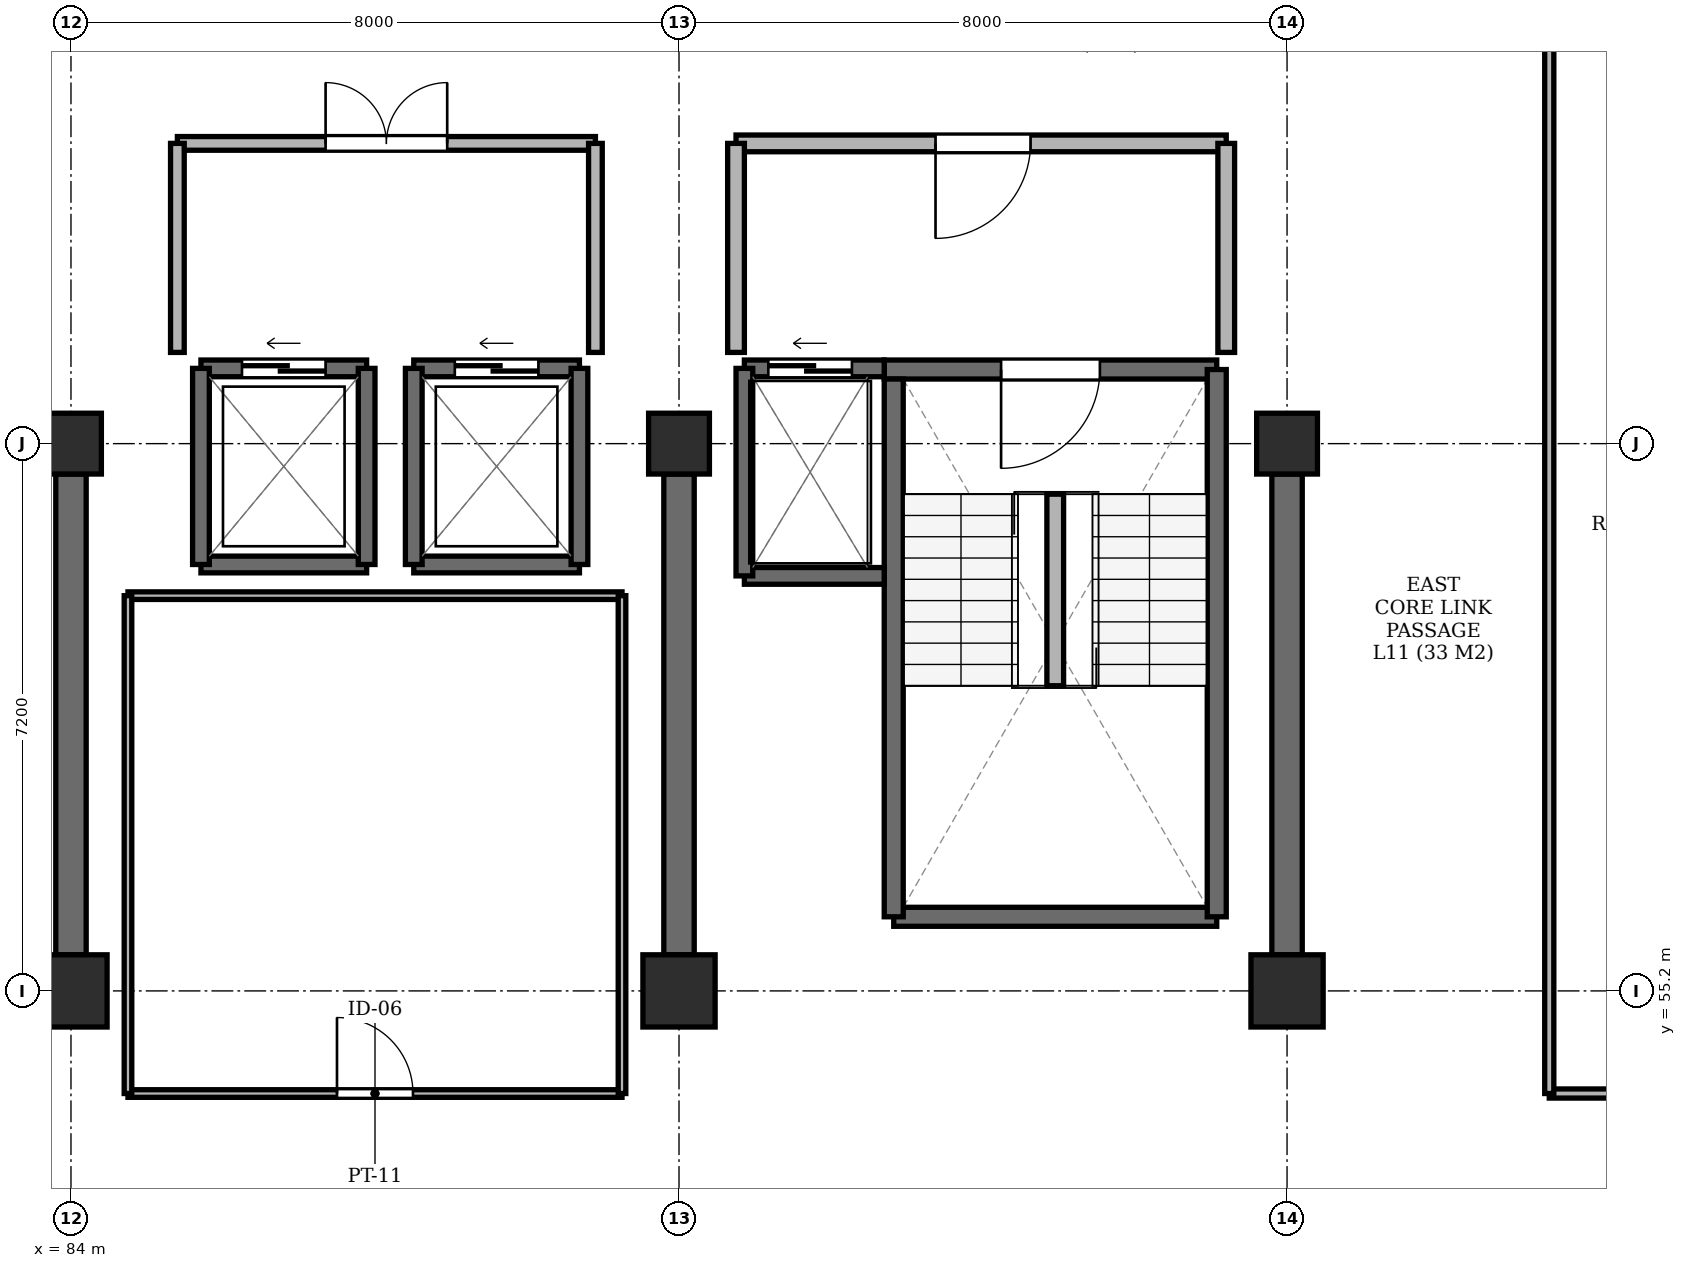
"""IFC4 building model, lengths in metres.
Left out: names, types, materials, properties, quantities, classifications, styles, units other than length and angle.
Written with IfcOpenShell. Run it as: python <this file> out.ifc"""

import sys

from ifc_helpers import new_model, si_unit, direction, frame, frame_2d, origin, origin_2d, place, context, subcontext, project, spatial, rectangle, extrude, element, fill, save


model = new_model("IFC4")
c1 = context("Model", 3, precision=1e-05, world=origin(), true_north=direction((0.0, 1.0)))
c2 = subcontext(c1, "Body", "Model", "MODEL_VIEW")
j1 = project(units=[si_unit("LENGTHUNIT", "METRE"), si_unit("PLANEANGLEUNIT", "RADIAN")], contexts=[c1])
p1 = place(None, origin())
s1 = spatial("IfcSite", under=j1, at=p1, CompositionType="ELEMENT")
p2 = place(p1, origin())
s2 = spatial("IfcBuilding", under=s1, at=p2, CompositionType="ELEMENT")
p3 = place(p2, frame((0.0, 0.0, 47.05)))
s3 = spatial("IfcBuildingStorey", under=s2, at=p3, CompositionType="ELEMENT", Elevation=47.05)
p4 = place(p3, frame((84.0, 55.2, -0.23), z_axis=(0.0, 0.0, 1.0), x_axis=(1.0, 0.0, 0.0)))
e1 = element("IfcColumn", 1, at=p4, inside=s3, PredefinedType="COLUMN", context=c2, shape_type="SweptSolid", body=[
    extrude(rectangle(XDim=0.95, YDim=0.95, at=origin_2d()), origin(), (0.0, 0.0, 1.0), 3.25),
])
p5 = place(p3, frame((84.0, 62.4, -0.23), z_axis=(0.0, 0.0, 1.0), x_axis=(1.0, 0.0, 0.0)))
e2 = element("IfcColumn", 2, at=p5, inside=s3, PredefinedType="COLUMN", context=c2, shape_type="SweptSolid", body=[
    extrude(rectangle(XDim=0.8, YDim=0.8, at=origin_2d()), origin(), (0.0, 0.0, 1.0), 3.25),
])
p6 = place(p3, frame((92.0, 55.2, -0.23), z_axis=(0.0, 0.0, 1.0), x_axis=(1.0, 0.0, 0.0)))
e3 = element("IfcColumn", 3, at=p6, inside=s3, PredefinedType="COLUMN", context=c2, shape_type="SweptSolid", body=[
    extrude(rectangle(XDim=0.95, YDim=0.95, at=origin_2d()), origin(), (0.0, 0.0, 1.0), 3.25),
])
p7 = place(p3, frame((92.0, 62.4, -0.23), z_axis=(0.0, 0.0, 1.0), x_axis=(1.0, 0.0, 0.0)))
e4 = element("IfcColumn", 4, at=p7, inside=s3, PredefinedType="COLUMN", context=c2, shape_type="SweptSolid", body=[
    extrude(rectangle(XDim=0.8, YDim=0.8, at=origin_2d()), origin(), (0.0, 0.0, 1.0), 3.25),
])
p8 = place(p3, frame((100.0, 55.2, -0.23), z_axis=(0.0, 0.0, 1.0), x_axis=(1.0, 0.0, 0.0)))
e5 = element("IfcColumn", 5, at=p8, inside=s3, PredefinedType="COLUMN", context=c2, shape_type="SweptSolid", body=[
    extrude(rectangle(XDim=0.95, YDim=0.95, at=origin_2d()), origin(), (0.0, 0.0, 1.0), 3.25),
])
p9 = place(p3, frame((100.0, 62.4, -0.23), z_axis=(0.0, 0.0, 1.0), x_axis=(1.0, 0.0, 0.0)))
e6 = element("IfcColumn", 6, at=p9, inside=s3, PredefinedType="COLUMN", context=c2, shape_type="SweptSolid", body=[
    extrude(rectangle(XDim=0.8, YDim=0.8, at=origin_2d()), origin(), (0.0, 0.0, 1.0), 3.25),
])
for number, where, z_axis, x_axis in (
    (7, (84.0, 55.675, 0.0), (0.0, 0.0, 1.0), (0.0, 1.0, 0.0)),
    (8, (92.0, 55.675, 0.0), (0.0, 0.0, 1.0), (0.0, 1.0, 0.0)),
    (9, (100.0, 55.675, 0.0), (0.0, 0.0, 1.0), (0.0, 1.0, 0.0)),
):
    element("IfcWall", number, at=place(p3, frame(where, z_axis=z_axis, x_axis=x_axis)), inside=s3, PredefinedType="SHEAR", context=c2, shape_type="SweptSolid", body=[
        extrude(rectangle(XDim=6.325, YDim=0.4, at=frame_2d((3.163, 0.0))), origin(), (0.0, 0.0, 1.0), 3.02),
    ])
p10 = place(p3, frame((94.825, 56.175, 0.0), z_axis=(0.0, 0.0, 1.0), x_axis=(1.0, 0.0, 0.0)))
e10 = element("IfcWall", 10, at=p10, inside=s3, PredefinedType="SHEAR", context=c2, shape_type="SweptSolid", body=[
    extrude(rectangle(XDim=4.25, YDim=0.25, at=frame_2d((2.125, 0.0))), origin(), (0.0, 0.0, 1.0), 3.02),
])
p11 = place(p3, frame((99.075, 63.375, 0.0), z_axis=(0.0, 0.0, 1.0), x_axis=(-1.0, 0.0, 0.0)))
e11 = element("IfcWall", 11, at=p11, inside=s3, PredefinedType="SHEAR", context=c2, shape_type="SweptSolid", body=[
    extrude(rectangle(XDim=4.375, YDim=0.25, at=frame_2d((2.188, 0.0))), origin(), (0.0, 0.0, 1.0), 3.02),
])
p12 = place(p11, frame((1.538, 0.0, 0.0)))
e12 = element("IfcOpeningElement", 12, at=p12, cuts=e11, PredefinedType="OPENING", context=c2, shape_type="SweptSolid", body=[
    extrude(rectangle(XDim=1.3, YDim=2.2, at=frame_2d((0.65, 1.1))), frame((0.0, 0.137, 0.0), z_axis=(0.0, -1.0, 0.0), x_axis=(1.0, 0.0, 0.0)), (0.0, 0.0, 1.0), 0.274),
])
p13 = place(p3, frame((94.825, 63.25, 0.0), z_axis=(0.0, 0.0, 1.0), x_axis=(0.0, -1.0, 0.0)))
e13 = element("IfcWall", 13, at=p13, inside=s3, PredefinedType="SHEAR", context=c2, shape_type="SweptSolid", body=[
    extrude(rectangle(XDim=7.075, YDim=0.25, at=frame_2d((3.538, 0.0))), origin(), (0.0, 0.0, 1.0), 3.02),
])
p14 = place(p3, frame((99.075, 56.175, 0.0), z_axis=(0.0, 0.0, 1.0), x_axis=(0.0, 1.0, 0.0)))
e14 = element("IfcWall", 14, at=p14, inside=s3, PredefinedType="SHEAR", context=c2, shape_type="SweptSolid", body=[
    extrude(rectangle(XDim=7.2, YDim=0.25, at=frame_2d((3.6, 0.0))), origin(), (0.0, 0.0, 1.0), 3.02),
])
p15 = place(p3, frame((96.95, 59.215, 0.0), z_axis=(0.0, 0.0, 1.0), x_axis=(0.0, 1.0, 0.0)))
e15 = element("IfcWall", 15, at=p15, inside=s3, PredefinedType="PARTITIONING", context=c2, shape_type="SweptSolid", body=[
    extrude(rectangle(XDim=2.52, YDim=0.22, at=frame_2d((1.26, 0.0))), origin(), (0.0, 0.0, 1.0), 3.02),
])
p16 = place(p3, frame((92.86, 60.66, 0.0), z_axis=(0.0, 0.0, 1.0), x_axis=(1.0, 0.0, 0.0)))
e16 = element("IfcWall", 16, at=p16, inside=s3, PredefinedType="SHEAR", context=c2, shape_type="SweptSolid", body=[
    extrude(rectangle(XDim=1.84, YDim=0.22, at=frame_2d((0.92, 0.0))), origin(), (0.0, 0.0, 1.0), 3.02),
])
p17 = place(p3, frame((94.7, 63.39, 0.0), z_axis=(0.0, 0.0, 1.0), x_axis=(-1.0, 0.0, 0.0)))
e17 = element("IfcWall", 17, at=p17, inside=s3, PredefinedType="SHEAR", context=c2, shape_type="SweptSolid", body=[
    extrude(rectangle(XDim=1.84, YDim=0.22, at=frame_2d((0.92, 0.0))), origin(), (0.0, 0.0, 1.0), 3.02),
])
p18 = place(p17, frame((0.425, 0.0, 0.0)))
e18 = element("IfcOpeningElement", 18, at=p18, cuts=e17, PredefinedType="OPENING", context=c2, shape_type="SweptSolid", body=[
    extrude(rectangle(XDim=1.1, YDim=2.2, at=frame_2d((0.55, 1.1))), frame((0.0, 0.122, 0.0), z_axis=(0.0, -1.0, 0.0), x_axis=(1.0, 0.0, 0.0)), (0.0, 0.0, 1.0), 0.244),
])
p19 = place(p3, frame((92.86, 63.39, 0.0), z_axis=(0.0, 0.0, 1.0), x_axis=(0.0, -1.0, 0.0)))
e19 = element("IfcWall", 19, at=p19, inside=s3, PredefinedType="SHEAR", context=c2, shape_type="SweptSolid", body=[
    extrude(rectangle(XDim=2.73, YDim=0.22, at=frame_2d((1.365, 0.0))), origin(), (0.0, 0.0, 1.0), 3.02),
])
p20 = place(p3, frame((85.71, 60.81, 0.0), z_axis=(0.0, 0.0, 1.0), x_axis=(1.0, 0.0, 0.0)))
e20 = element("IfcWall", 20, at=p20, inside=s3, PredefinedType="SHEAR", context=c2, shape_type="SweptSolid", body=[
    extrude(rectangle(XDim=2.18, YDim=0.22, at=frame_2d((1.09, 0.0))), origin(), (0.0, 0.0, 1.0), 3.02),
])
p21 = place(p3, frame((87.89, 63.39, 0.0), z_axis=(0.0, 0.0, 1.0), x_axis=(-1.0, 0.0, 0.0)))
e21 = element("IfcWall", 21, at=p21, inside=s3, PredefinedType="SHEAR", context=c2, shape_type="SweptSolid", body=[
    extrude(rectangle(XDim=2.18, YDim=0.22, at=frame_2d((1.09, 0.0))), origin(), (0.0, 0.0, 1.0), 3.02),
])
p22 = place(p21, frame((0.54, 0.0, 0.0)))
e22 = element("IfcOpeningElement", 22, at=p22, cuts=e21, PredefinedType="OPENING", context=c2, shape_type="SweptSolid", body=[
    extrude(rectangle(XDim=1.1, YDim=2.2, at=frame_2d((0.55, 1.1))), frame((0.0, 0.122, 0.0), z_axis=(0.0, -1.0, 0.0), x_axis=(1.0, 0.0, 0.0)), (0.0, 0.0, 1.0), 0.244),
])
for number, where, z_axis, x_axis in (
    (23, (85.71, 63.39, 0.0), (0.0, 0.0, 1.0), (0.0, -1.0, 0.0)),
    (24, (87.89, 60.81, 0.0), (0.0, 0.0, 1.0), (0.0, 1.0, 0.0)),
):
    element("IfcWall", number, at=place(p3, frame(where, z_axis=z_axis, x_axis=x_axis)), inside=s3, PredefinedType="SHEAR", context=c2, shape_type="SweptSolid", body=[
        extrude(rectangle(XDim=2.58, YDim=0.22, at=frame_2d((1.29, 0.0))), origin(), (0.0, 0.0, 1.0), 3.02),
    ])
p23 = place(p3, frame((88.51, 60.81, 0.0), z_axis=(0.0, 0.0, 1.0), x_axis=(1.0, 0.0, 0.0)))
e25 = element("IfcWall", 25, at=p23, inside=s3, PredefinedType="SHEAR", context=c2, shape_type="SweptSolid", body=[
    extrude(rectangle(XDim=2.18, YDim=0.22, at=frame_2d((1.09, 0.0))), origin(), (0.0, 0.0, 1.0), 3.02),
])
p24 = place(p3, frame((90.69, 63.39, 0.0), z_axis=(0.0, 0.0, 1.0), x_axis=(-1.0, 0.0, 0.0)))
e26 = element("IfcWall", 26, at=p24, inside=s3, PredefinedType="SHEAR", context=c2, shape_type="SweptSolid", body=[
    extrude(rectangle(XDim=2.18, YDim=0.22, at=frame_2d((1.09, 0.0))), origin(), (0.0, 0.0, 1.0), 3.02),
])
p25 = place(p24, frame((0.54, 0.0, 0.0)))
e27 = element("IfcOpeningElement", 27, at=p25, cuts=e26, PredefinedType="OPENING", context=c2, shape_type="SweptSolid", body=[
    extrude(rectangle(XDim=1.1, YDim=2.2, at=frame_2d((0.55, 1.1))), frame((0.0, 0.122, 0.0), z_axis=(0.0, -1.0, 0.0), x_axis=(1.0, 0.0, 0.0)), (0.0, 0.0, 1.0), 0.244),
])
for number, where, z_axis, x_axis in (
    (28, (88.51, 63.39, 0.0), (0.0, 0.0, 1.0), (0.0, -1.0, 0.0)),
    (29, (90.69, 60.81, 0.0), (0.0, 0.0, 1.0), (0.0, 1.0, 0.0)),
):
    element("IfcWall", number, at=place(p3, frame(where, z_axis=z_axis, x_axis=x_axis)), inside=s3, PredefinedType="SHEAR", context=c2, shape_type="SweptSolid", body=[
        extrude(rectangle(XDim=2.58, YDim=0.22, at=frame_2d((1.29, 0.0))), origin(), (0.0, 0.0, 1.0), 3.02),
    ])
p26 = place(p3, frame((92.75, 66.35, 0.0), z_axis=(0.0, 0.0, 1.0), x_axis=(1.0, 0.0, 0.0)))
e30 = element("IfcWall", 30, at=p26, inside=s3, PredefinedType="PARTITIONING", context=c2, shape_type="SweptSolid", body=[
    extrude(rectangle(XDim=6.45, YDim=0.22, at=frame_2d((3.225, 0.0))), origin(), (0.0, 0.0, 1.0), 2.53),
])
p27 = place(p26, frame((2.625, 0.0, 0.0)))
e31 = element("IfcOpeningElement", 31, at=p27, cuts=e30, PredefinedType="OPENING", context=c2, shape_type="SweptSolid", body=[
    extrude(rectangle(XDim=1.25, YDim=2.2, at=frame_2d((0.625, 1.1))), frame((0.0, 0.122, 0.0), z_axis=(0.0, -1.0, 0.0), x_axis=(1.0, 0.0, 0.0)), (0.0, 0.0, 1.0), 0.244),
])
for number, where, z_axis, x_axis in (
    (32, (92.75, 63.6, 0.0), (0.0, 0.0, 1.0), (0.0, 1.0, 0.0)),
    (33, (99.2, 63.6, 0.0), (0.0, 0.0, 1.0), (0.0, 1.0, 0.0)),
):
    element("IfcWall", number, at=place(p3, frame(where, z_axis=z_axis, x_axis=x_axis)), inside=s3, PredefinedType="PARTITIONING", context=c2, shape_type="SweptSolid", body=[
        extrude(rectangle(XDim=2.75, YDim=0.22, at=frame_2d((1.375, 0.0))), origin(), (0.0, 0.0, 1.0), 2.53),
    ])
p28 = place(p3, frame((85.4, 66.35, 0.0), z_axis=(0.0, 0.0, 1.0), x_axis=(1.0, 0.0, 0.0)))
e34 = element("IfcWall", 34, at=p28, inside=s3, PredefinedType="PARTITIONING", context=c2, shape_type="SweptSolid", body=[
    extrude(rectangle(XDim=5.5, YDim=0.18, at=frame_2d((2.75, 0.0))), origin(), (0.0, 0.0, 1.0), 2.53),
])
p29 = place(p28, frame((1.95, 0.0, 0.0)))
e35 = element("IfcOpeningElement", 35, at=p29, cuts=e34, PredefinedType="OPENING", context=c2, shape_type="SweptSolid", body=[
    extrude(rectangle(XDim=1.6, YDim=2.2, at=frame_2d((0.8, 1.1))), frame((0.0, 0.102, 0.0), z_axis=(0.0, -1.0, 0.0), x_axis=(1.0, 0.0, 0.0)), (0.0, 0.0, 1.0), 0.204),
])
for number, where, z_axis, x_axis in (
    (36, (85.4, 63.6, 0.0), (0.0, 0.0, 1.0), (0.0, 1.0, 0.0)),
    (37, (90.9, 63.6, 0.0), (0.0, 0.0, 1.0), (0.0, 1.0, 0.0)),
):
    element("IfcWall", number, at=place(p3, frame(where, z_axis=z_axis, x_axis=x_axis)), inside=s3, PredefinedType="PARTITIONING", context=c2, shape_type="SweptSolid", body=[
        extrude(rectangle(XDim=2.75, YDim=0.18, at=frame_2d((1.375, 0.0))), origin(), (0.0, 0.0, 1.0), 2.53),
    ])
p30 = place(p3, frame((103.45, 53.85, 0.0), z_axis=(0.0, 0.0, 1.0), x_axis=(1.0, 0.0, 0.0)))
e38 = element("IfcWall", 38, at=p30, inside=s3, PredefinedType="PARTITIONING", context=c2, shape_type="SweptSolid", body=[
    extrude(rectangle(XDim=3.75, YDim=0.12, at=frame_2d((1.875, 0.0))), origin(), (0.0, 0.0, 1.0), 2.53),
])
p31 = place(p30, frame((1.325, 0.0, 0.0)))
e39 = element("IfcOpeningElement", 39, at=p31, cuts=e38, PredefinedType="OPENING", context=c2, shape_type="SweptSolid", body=[
    extrude(rectangle(XDim=1.05, YDim=2.15, at=frame_2d((0.525, 1.075))), frame((0.0, 0.072, 0.0), z_axis=(0.0, -1.0, 0.0), x_axis=(1.0, 0.0, 0.0)), (0.0, 0.0, 1.0), 0.144),
])
p32 = place(p3, frame((103.45, 53.85, 0.0), z_axis=(0.0, 0.0, 1.0), x_axis=(0.0, 1.0, 0.0)))
e40 = element("IfcWall", 40, at=p32, inside=s3, PredefinedType="PARTITIONING", context=c2, shape_type="SweptSolid", body=[
    extrude(rectangle(XDim=14.95, YDim=0.12, at=frame_2d((7.475, 0.0))), origin(), (0.0, 0.0, 1.0), 2.53),
])
p33 = place(p3, frame((84.75, 53.85, 0.0), z_axis=(0.0, 0.0, 1.0), x_axis=(1.0, 0.0, 0.0)))
e41 = element("IfcWall", 41, at=p33, inside=s3, PredefinedType="PARTITIONING", context=c2, shape_type="SweptSolid", body=[
    extrude(rectangle(XDim=6.5, YDim=0.1, at=frame_2d((3.25, 0.0))), origin(), (0.0, 0.0, 1.0), 2.53),
])
p34 = place(p33, frame((2.75, 0.0, 0.0)))
e42 = element("IfcOpeningElement", 42, at=p34, cuts=e41, PredefinedType="OPENING", context=c2, shape_type="SweptSolid", body=[
    extrude(rectangle(XDim=1.0, YDim=2.15, at=frame_2d((0.5, 1.075))), frame((0.0, 0.062, 0.0), z_axis=(0.0, -1.0, 0.0), x_axis=(1.0, 0.0, 0.0)), (0.0, 0.0, 1.0), 0.124),
])
p35 = place(p3, frame((84.75, 60.4, 0.0), z_axis=(0.0, 0.0, 1.0), x_axis=(1.0, 0.0, 0.0)))
e43 = element("IfcWall", 43, at=p35, inside=s3, PredefinedType="PARTITIONING", context=c2, shape_type="SweptSolid", body=[
    extrude(rectangle(XDim=6.5, YDim=0.1, at=frame_2d((3.25, 0.0))), origin(), (0.0, 0.0, 1.0), 2.53),
])
for number, where, z_axis, x_axis in (
    (44, (84.75, 53.85, 0.0), (0.0, 0.0, 1.0), (0.0, 1.0, 0.0)),
    (45, (91.25, 53.85, 0.0), (0.0, 0.0, 1.0), (0.0, 1.0, 0.0)),
):
    element("IfcWall", number, at=place(p3, frame(where, z_axis=z_axis, x_axis=x_axis)), inside=s3, PredefinedType="PARTITIONING", context=c2, shape_type="SweptSolid", body=[
        extrude(rectangle(XDim=6.55, YDim=0.1, at=frame_2d((3.275, 0.0))), origin(), (0.0, 0.0, 1.0), 2.53),
    ])
p36 = place(p12, origin())
e46 = element("IfcDoor", 46, at=p36, inside=s3, OperationType="SINGLE_SWING_RIGHT", PredefinedType="DOOR", context=c2, shape_type="SweptSolid", body=[
    extrude(rectangle(XDim=1.3, YDim=2.2, at=frame_2d((0.65, 1.1))), frame((0.0, 0.025, 0.0), z_axis=(0.0, -1.0, 0.0), x_axis=(1.0, 0.0, 0.0)), (0.0, 0.0, 1.0), 0.05),
])
fill(e12, e46)
p37 = place(p18, origin())
e47 = element("IfcDoor", 47, at=p37, inside=s3, OperationType="SLIDING_TO_RIGHT", PredefinedType="DOOR", context=c2, shape_type="SweptSolid", body=[
    extrude(rectangle(XDim=1.1, YDim=2.2, at=frame_2d((0.55, 1.1))), frame((0.0, 0.025, 0.0), z_axis=(0.0, -1.0, 0.0), x_axis=(1.0, 0.0, 0.0)), (0.0, 0.0, 1.0), 0.05),
])
fill(e18, e47)
p38 = place(p22, origin())
e48 = element("IfcDoor", 48, at=p38, inside=s3, OperationType="SLIDING_TO_RIGHT", PredefinedType="DOOR", context=c2, shape_type="SweptSolid", body=[
    extrude(rectangle(XDim=1.1, YDim=2.2, at=frame_2d((0.55, 1.1))), frame((0.0, 0.025, 0.0), z_axis=(0.0, -1.0, 0.0), x_axis=(1.0, 0.0, 0.0)), (0.0, 0.0, 1.0), 0.05),
])
fill(e22, e48)
p39 = place(p25, origin())
e49 = element("IfcDoor", 49, at=p39, inside=s3, OperationType="SLIDING_TO_RIGHT", PredefinedType="DOOR", context=c2, shape_type="SweptSolid", body=[
    extrude(rectangle(XDim=1.1, YDim=2.2, at=frame_2d((0.55, 1.1))), frame((0.0, 0.025, 0.0), z_axis=(0.0, -1.0, 0.0), x_axis=(1.0, 0.0, 0.0)), (0.0, 0.0, 1.0), 0.05),
])
fill(e27, e49)
p40 = place(p27, frame((1.25, 0.0, 0.0), z_axis=(0.0, 0.0, 1.0), x_axis=(-1.0, 0.0, 0.0)))
e50 = element("IfcDoor", 50, at=p40, inside=s3, OperationType="SINGLE_SWING_LEFT", PredefinedType="DOOR", context=c2, shape_type="SweptSolid", body=[
    extrude(rectangle(XDim=1.25, YDim=2.2, at=frame_2d((0.625, 1.1))), frame((0.0, 0.025, 0.0), z_axis=(0.0, -1.0, 0.0), x_axis=(1.0, 0.0, 0.0)), (0.0, 0.0, 1.0), 0.05),
])
fill(e31, e50)
p41 = place(p29, origin())
e51 = element("IfcDoor", 51, at=p41, inside=s3, OperationType="DOUBLE_DOOR_SINGLE_SWING", PredefinedType="DOOR", context=c2, shape_type="SweptSolid", body=[
    extrude(rectangle(XDim=1.6, YDim=2.2, at=frame_2d((0.8, 1.1))), frame((0.0, 0.025, 0.0), z_axis=(0.0, -1.0, 0.0), x_axis=(1.0, 0.0, 0.0)), (0.0, 0.0, 1.0), 0.05),
])
fill(e35, e51)
p42 = place(p34, origin())
e52 = element("IfcDoor", 52, at=p42, inside=s3, OperationType="SINGLE_SWING_LEFT", PredefinedType="DOOR", context=c2, shape_type="SweptSolid", body=[
    extrude(rectangle(XDim=1.0, YDim=2.15, at=frame_2d((0.5, 1.075))), frame((0.0, 0.025, 0.0), z_axis=(0.0, -1.0, 0.0), x_axis=(1.0, 0.0, 0.0)), (0.0, 0.0, 1.0), 0.05),
])
fill(e42, e52)
save(model, sys.argv[1])
